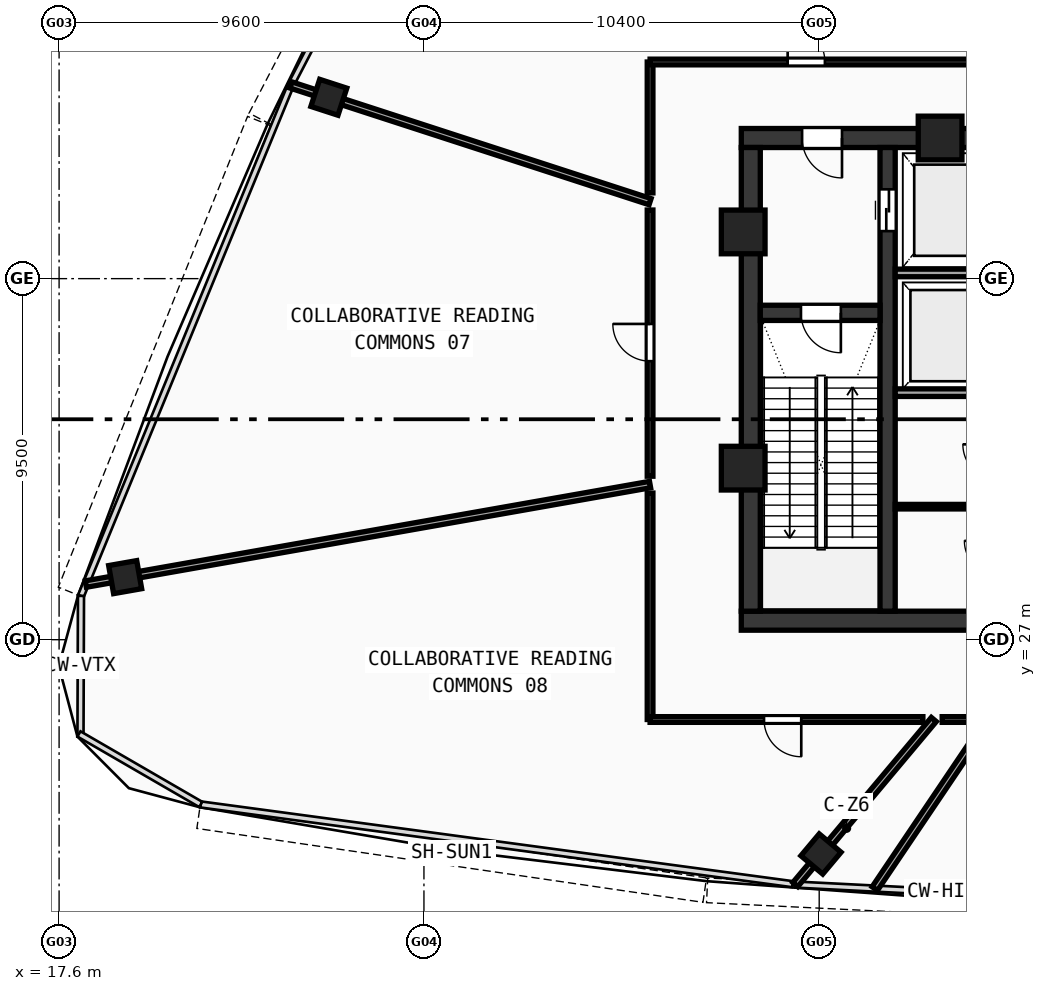
"""IFC4 building model, lengths in metres.
Left out: names, types, materials, properties, quantities, classifications, styles, units other than length and angle.
Written with IfcOpenShell. Run it as: python <this file> out.ifc"""

import sys

from ifc_helpers import new_model, si_unit, direction, frame, frame_2d, origin, origin_with_axes, origin_2d, place, context, subcontext, project, spatial, rectangle, hollow_rectangle, extrude, source, transform, mapped, element, fill, save


model = new_model("IFC4")
c1 = context("Model", 3, precision=1e-05, world=origin(), true_north=direction((0.0, 1.0)))
c2 = subcontext(c1, "Body", "Model", "MODEL_VIEW")
j1 = project(units=[si_unit("LENGTHUNIT", "METRE"), si_unit("PLANEANGLEUNIT", "RADIAN")], contexts=[c1])
p1 = place(None, origin())
s1 = spatial("IfcSite", under=j1, at=p1, CompositionType="ELEMENT")
p2 = place(p1, origin())
s2 = spatial("IfcBuilding", under=s1, at=p2, CompositionType="ELEMENT")
p3 = place(p2, frame((0.0, 0.0, 314.86)))
s3 = spatial("IfcBuildingStorey", under=s2, at=p3, CompositionType="ELEMENT", Elevation=314.86)
p4 = place(p3, frame((35.55, 27.5, 0.0), z_axis=(0.0, 0.0, 1.0), x_axis=(1.0, 0.0, 0.0)))
e1 = element("IfcWall", 1, at=p4, inside=s3, PredefinedType="SHEAR", context=c2, shape_type="SweptSolid", body=[
    extrude(rectangle(XDim=24.9, YDim=0.5, at=frame_2d((12.45, 0.0))), origin(), (0.0, 0.0, 1.0), 5.57),
])
p5 = place(p3, frame((35.55, 40.2, 0.0), z_axis=(0.0, 0.0, 1.0), x_axis=(1.0, 0.0, 0.0)))
e2 = element("IfcWall", 2, at=p5, inside=s3, PredefinedType="SHEAR", context=c2, shape_type="SweptSolid", body=[
    extrude(rectangle(XDim=11.25, YDim=0.5, at=frame_2d((5.625, 0.0))), origin(), (0.0, 0.0, 1.0), 5.57),
])
p6 = place(p5, frame((1.6, 0.0, 0.0)))
e3 = element("IfcOpeningElement", 3, at=p6, cuts=e2, PredefinedType="OPENING", context=c2, shape_type="SweptSolid", body=[
    extrude(rectangle(XDim=1.05, YDim=2.1, at=frame_2d((0.525, 1.05))), frame((0.0, 0.26, 0.0), z_axis=(0.0, -1.0, 0.0), x_axis=(1.0, 0.0, 0.0)), (0.0, 0.0, 1.0), 0.52),
])
p7 = place(p3, frame((35.8, 27.75, 0.0), z_axis=(0.0, 0.0, 1.0), x_axis=(0.0, 1.0, 0.0)))
e4 = element("IfcWall", 4, at=p7, inside=s3, PredefinedType="SHEAR", context=c2, shape_type="SweptSolid", body=[
    extrude(rectangle(XDim=12.2, YDim=0.5, at=frame_2d((6.1, 0.0))), origin(), (0.0, 0.0, 1.0), 5.57),
])
p8 = place(p3, frame((39.4, 27.75, 0.0), z_axis=(0.0, 0.0, 1.0), x_axis=(0.0, 1.0, 0.0)))
e5 = element("IfcWall", 5, at=p8, inside=s3, PredefinedType="SHEAR", context=c2, shape_type="SweptSolid", body=[
    extrude(rectangle(XDim=12.2, YDim=0.4, at=frame_2d((6.1, 0.0))), origin(), (0.0, 0.0, 1.0), 5.57),
])
p9 = place(p8, frame((10.0, 0.0, 0.0)))
e6 = element("IfcOpeningElement", 6, at=p9, cuts=e5, PredefinedType="OPENING", context=c2, shape_type="SweptSolid", body=[
    extrude(rectangle(XDim=1.1, YDim=2.1, at=frame_2d((0.55, 1.05))), frame((0.0, 0.21, 0.0), z_axis=(0.0, -1.0, 0.0), x_axis=(1.0, 0.0, 0.0)), (0.0, 0.0, 1.0), 0.42),
])
p10 = place(p3, frame((36.05, 35.6, 0.0), z_axis=(0.0, 0.0, 1.0), x_axis=(1.0, 0.0, 0.0)))
e7 = element("IfcWall", 7, at=p10, inside=s3, PredefinedType="SHEAR", context=c2, shape_type="SweptSolid", body=[
    extrude(rectangle(XDim=3.15, YDim=0.4, at=frame_2d((1.575, 0.0))), origin(), (0.0, 0.0, 1.0), 5.57),
])
p11 = place(p10, frame((1.07, 0.0, 0.0)))
e8 = element("IfcOpeningElement", 8, at=p11, cuts=e7, PredefinedType="OPENING", context=c2, shape_type="SweptSolid", body=[
    extrude(rectangle(XDim=1.05, YDim=2.1, at=frame_2d((0.525, 1.05))), frame((0.0, 0.21, 0.0), z_axis=(0.0, -1.0, 0.0), x_axis=(1.0, 0.0, 0.0)), (0.0, 0.0, 1.0), 0.42),
])
m1 = source(origin(), c2, "Body", "SweptSolid", [
    extrude(hollow_rectangle(XDim=1.15, YDim=1.15, WallThickness=0.048, at=origin_2d()), origin(), (0.0, 0.0, 1.0), 5.83),
])
for number, where, z_axis, x_axis in (
    (9, (40.781, 40.2, -0.26), (0.0, 0.0, 1.0), (1.0, 0.0, 0.0)),
    (10, (35.6, 37.729, -0.26), (0.0, 0.0, 1.0), (1.0, 0.0, 0.0)),
    (11, (35.6, 31.513, -0.26), (0.0, 0.0, 1.0), (1.0, 0.0, 0.0)),
):
    element("IfcColumn", number, at=place(p3, frame(where, z_axis=z_axis, x_axis=x_axis)), inside=s3, PredefinedType="COLUMN", context=c2, shape_type="MappedRepresentation", body=[
        mapped(m1, transform((0.0, 0.0, 0.0), scale=1.0)),
    ])
m2 = source(origin(), c2, "Body", "SweptSolid", [
    extrude(hollow_rectangle(XDim=0.75, YDim=0.75, WallThickness=0.028, at=origin_2d()), origin(), (0.0, 0.0, 1.0), 5.83),
])
for number, where, z_axis, x_axis in (
    (12, (37.647, 21.362, -0.26), (0.0, 0.0, 1.0), (0.766, -0.643, 0.0)),
    (13, (24.698, 41.271, -0.26), (0.0, 0.0, 1.0), (-0.309, -0.951, 0.0)),
    (14, (19.338, 28.646, -0.26), (0.0, 0.0, 1.0), (0.174, -0.985, 0.0)),
):
    element("IfcColumn", number, at=place(p3, frame(where, z_axis=z_axis, x_axis=x_axis)), inside=s3, PredefinedType="COLUMN", context=c2, shape_type="MappedRepresentation", body=[
        mapped(m2, transform((0.0, 0.0, 0.0), scale=1.0)),
    ])
for number, where, z_axis, x_axis in (
    (15, (39.6, 36.65, 0.0), (0.0, 0.0, 1.0), (1.0, 0.0, 0.0)),
    (16, (39.6, 33.5, 0.0), (0.0, 0.0, 1.0), (1.0, 0.0, 0.0)),
):
    element("IfcWall", number, at=place(p3, frame(where, z_axis=z_axis, x_axis=x_axis)), inside=s3, PredefinedType="SOLIDWALL", context=c2, shape_type="SweptSolid", body=[
        extrude(rectangle(XDim=2.72, YDim=0.2, at=frame_2d((1.36, 0.0))), origin(), (0.0, 0.0, 1.0), 5.57),
    ])
p12 = place(p3, frame((39.6, 30.5, 0.0), z_axis=(0.0, 0.0, 1.0), x_axis=(1.0, 0.0, 0.0)))
e17 = element("IfcWall", 17, at=p12, inside=s3, PredefinedType="PARTITIONING", context=c2, shape_type="SweptSolid", body=[
    extrude(rectangle(XDim=2.72, YDim=0.12, at=frame_2d((1.36, 0.0))), origin(), (0.0, 0.0, 1.0), 5.57),
])
p13 = place(p3, frame((33.15, 38.525, 0.0), z_axis=(0.0, 0.0, 1.0), x_axis=(-0.951056273407, 0.309017741906, 0.0)))
e18 = element("IfcWall", 18, at=p13, inside=s3, PredefinedType="PARTITIONING", context=c2, shape_type="SweptSolid", body=[
    extrude(rectangle(XDim=9.937, YDim=0.17, at=frame_2d((4.969, 0.0))), origin(), (0.0, 0.0, 1.0), 2.22),
])
p14 = place(p3, frame((33.15, 31.082, 0.0), z_axis=(0.0, 0.0, 1.0), x_axis=(-0.984808005161, -0.173646747654, 0.0)))
e19 = element("IfcWall", 19, at=p14, inside=s3, PredefinedType="PARTITIONING", context=c2, shape_type="SweptSolid", body=[
    extrude(rectangle(XDim=15.075, YDim=0.17, at=frame_2d((7.537, 0.0))), origin(), (0.0, 0.0, 1.0), 2.22),
])
p15 = place(p3, frame((40.616, 24.9, 0.0), z_axis=(0.0, 0.0, 1.0), x_axis=(-0.642790029712, -0.76604241247, 0.0)))
e20 = element("IfcWall", 20, at=p15, inside=s3, PredefinedType="PARTITIONING", context=c2, shape_type="SweptSolid", body=[
    extrude(rectangle(XDim=5.669, YDim=0.17, at=frame_2d((2.834, 0.0))), origin(), (0.0, 0.0, 1.0), 2.22),
])
p16 = place(p3, frame((42.064, 24.9, 0.0), z_axis=(0.0, 0.0, 1.0), x_axis=(-0.559175120789, -0.829049566848, 0.0)))
e21 = element("IfcWall", 21, at=p16, inside=s3, PredefinedType="PARTITIONING", context=c2, shape_type="SweptSolid", body=[
    extrude(rectangle(XDim=5.366, YDim=0.17, at=frame_2d((2.683, 0.0))), origin(), (0.0, 0.0, 1.0), 4.97),
])
p17 = place(p3, frame((33.15, 24.9, 0.0), z_axis=(0.0, 0.0, 1.0), x_axis=(0.0, 1.0, 0.0)))
e22 = element("IfcWall", 22, at=p17, inside=s3, PredefinedType="PARTITIONING", context=c2, shape_type="SweptSolid", body=[
    extrude(rectangle(XDim=5.958, YDim=0.15, at=frame_2d((2.979, 0.0))), origin(), (0.0, 0.0, 1.0), 2.22),
])
p18 = place(p3, frame((33.15, 31.301, 0.0), z_axis=(0.0, 0.0, 1.0), x_axis=(0.0, 1.0, 0.0)))
e23 = element("IfcWall", 23, at=p18, inside=s3, PredefinedType="PARTITIONING", context=c2, shape_type="SweptSolid", body=[
    extrude(rectangle(XDim=7.004, YDim=0.15, at=frame_2d((3.502, 0.0))), origin(), (0.0, 0.0, 1.0), 2.22),
])
p19 = place(p18, frame((3.027, 0.0, 0.0)))
e24 = element("IfcOpeningElement", 24, at=p19, cuts=e23, PredefinedType="OPENING", context=c2, shape_type="SweptSolid", body=[
    extrude(rectangle(XDim=0.98, YDim=2.12, at=frame_2d((0.49, 1.06))), frame((0.0, 0.085, 0.0), z_axis=(0.0, -1.0, 0.0), x_axis=(1.0, 0.0, 0.0)), (0.0, 0.0, 1.0), 0.17),
])
p20 = place(p3, frame((33.15, 38.756, 0.0), z_axis=(0.0, 0.0, 1.0), x_axis=(0.0, 1.0, 0.0)))
e25 = element("IfcWall", 25, at=p20, inside=s3, PredefinedType="PARTITIONING", context=c2, shape_type="SweptSolid", body=[
    extrude(rectangle(XDim=3.444, YDim=0.15, at=frame_2d((1.722, 0.0))), origin(), (0.0, 0.0, 1.0), 2.22),
])
p21 = place(p3, frame((33.15, 42.2, 0.0), z_axis=(0.0, 0.0, 1.0), x_axis=(1.0, 0.0, 0.0)))
e26 = element("IfcWall", 26, at=p21, inside=s3, PredefinedType="PARTITIONING", context=c2, shape_type="SweptSolid", body=[
    extrude(rectangle(XDim=8.43, YDim=0.15, at=frame_2d((4.215, 0.0))), origin(), (0.0, 0.0, 1.0), 2.22),
])
p22 = place(p21, frame((3.62, 0.0, 0.0)))
e27 = element("IfcOpeningElement", 27, at=p22, cuts=e26, PredefinedType="OPENING", context=c2, shape_type="SweptSolid", body=[
    extrude(rectangle(XDim=0.98, YDim=2.12, at=frame_2d((0.49, 1.06))), frame((0.0, 0.085, 0.0), z_axis=(0.0, -1.0, 0.0), x_axis=(1.0, 0.0, 0.0)), (0.0, 0.0, 1.0), 0.17),
])
p23 = place(p3, frame((41.799, 24.9, 0.0), z_axis=(0.0, 0.0, 1.0), x_axis=(-1.0, 0.0, 0.0)))
e28 = element("IfcWall", 28, at=p23, inside=s3, PredefinedType="PARTITIONING", context=c2, shape_type="SweptSolid", body=[
    extrude(rectangle(XDim=0.963, YDim=0.15, at=frame_2d((0.481, 0.0))), origin(), (0.0, 0.0, 1.0), 2.22),
])
p24 = place(p3, frame((40.329, 24.9, 0.0), z_axis=(0.0, 0.0, 1.0), x_axis=(-1.0, 0.0, 0.0)))
e29 = element("IfcWall", 29, at=p24, inside=s3, PredefinedType="PARTITIONING", context=c2, shape_type="SweptSolid", body=[
    extrude(rectangle(XDim=7.179, YDim=0.15, at=frame_2d((3.589, 0.0))), origin(), (0.0, 0.0, 1.0), 2.22),
])
p25 = place(p24, frame((3.201, 0.0, 0.0)))
e30 = element("IfcOpeningElement", 30, at=p25, cuts=e29, PredefinedType="OPENING", context=c2, shape_type="SweptSolid", body=[
    extrude(rectangle(XDim=0.98, YDim=2.12, at=frame_2d((0.49, 1.06))), frame((0.0, 0.085, 0.0), z_axis=(0.0, -1.0, 0.0), x_axis=(1.0, 0.0, 0.0)), (0.0, 0.0, 1.0), 0.17),
])
m3 = source(origin(), c2, "Body", "SweptSolid", [
    extrude(rectangle(XDim=1.05, YDim=2.1, at=frame_2d((0.525, 1.05))), frame((0.0, 0.025, 0.0), z_axis=(0.0, -1.0, 0.0), x_axis=(1.0, 0.0, 0.0)), (0.0, 0.0, 1.0), 0.05),
])
p26 = place(p11, frame((1.05, 0.0, 0.0), z_axis=(0.0, 0.0, 1.0), x_axis=(-1.0, 0.0, 0.0)))
e31 = element("IfcDoor", 31, at=p26, inside=s3, OperationType="SINGLE_SWING_LEFT", PredefinedType="DOOR", context=c2, shape_type="MappedRepresentation", body=[
    mapped(m3, transform((0.0, 0.0, 0.0), scale=1.0)),
])
fill(e8, e31)
p27 = place(p6, frame((1.05, 0.0, 0.0), z_axis=(0.0, 0.0, 1.0), x_axis=(-1.0, 0.0, 0.0)))
e32 = element("IfcDoor", 32, at=p27, inside=s3, OperationType="SINGLE_SWING_LEFT", PredefinedType="DOOR", context=c2, shape_type="MappedRepresentation", body=[
    mapped(m3, transform((0.0, 0.0, 0.0), scale=1.0)),
])
fill(e3, e32)
m4 = source(origin(), c2, "Body", "SweptSolid", [
    extrude(rectangle(XDim=1.1, YDim=2.1, at=frame_2d((0.55, 1.05))), frame((0.0, 0.025, 0.0), z_axis=(0.0, -1.0, 0.0), x_axis=(1.0, 0.0, 0.0)), (0.0, 0.0, 1.0), 0.05),
])
p28 = place(p9, frame((1.1, 0.0, 0.0), z_axis=(0.0, 0.0, 1.0), x_axis=(-1.0, 0.0, 0.0)))
e33 = element("IfcDoor", 33, at=p28, inside=s3, OperationType="DOUBLE_DOOR_SLIDING", PredefinedType="DOOR", context=c2, shape_type="MappedRepresentation", body=[
    mapped(m4, transform((0.0, 0.0, 0.0), scale=1.0)),
])
fill(e6, e33)
m5 = source(origin(), c2, "Body", "SweptSolid", [
    extrude(rectangle(XDim=0.98, YDim=2.12, at=frame_2d((0.49, 1.06))), frame((0.0, 0.025, 0.0), z_axis=(0.0, -1.0, 0.0), x_axis=(1.0, 0.0, 0.0)), (0.0, 0.0, 1.0), 0.05),
])
p29 = place(p22, origin_with_axes())
e34 = element("IfcDoor", 34, at=p29, inside=s3, OperationType="SINGLE_SWING_LEFT", PredefinedType="DOOR", context=c2, shape_type="MappedRepresentation", body=[
    mapped(m5, transform((0.0, 0.0, 0.0), scale=1.0)),
])
fill(e27, e34)
p30 = place(p19, origin_with_axes())
e35 = element("IfcDoor", 35, at=p30, inside=s3, OperationType="SINGLE_SWING_RIGHT", PredefinedType="DOOR", context=c2, shape_type="MappedRepresentation", body=[
    mapped(m5, transform((0.0, 0.0, 0.0), scale=1.0)),
])
fill(e24, e35)
p31 = place(p25, origin_with_axes())
e36 = element("IfcDoor", 36, at=p31, inside=s3, OperationType="SINGLE_SWING_LEFT", PredefinedType="DOOR", context=c2, shape_type="MappedRepresentation", body=[
    mapped(m5, transform((0.0, 0.0, 0.0), scale=1.0)),
])
fill(e30, e36)
save(model, sys.argv[1])
